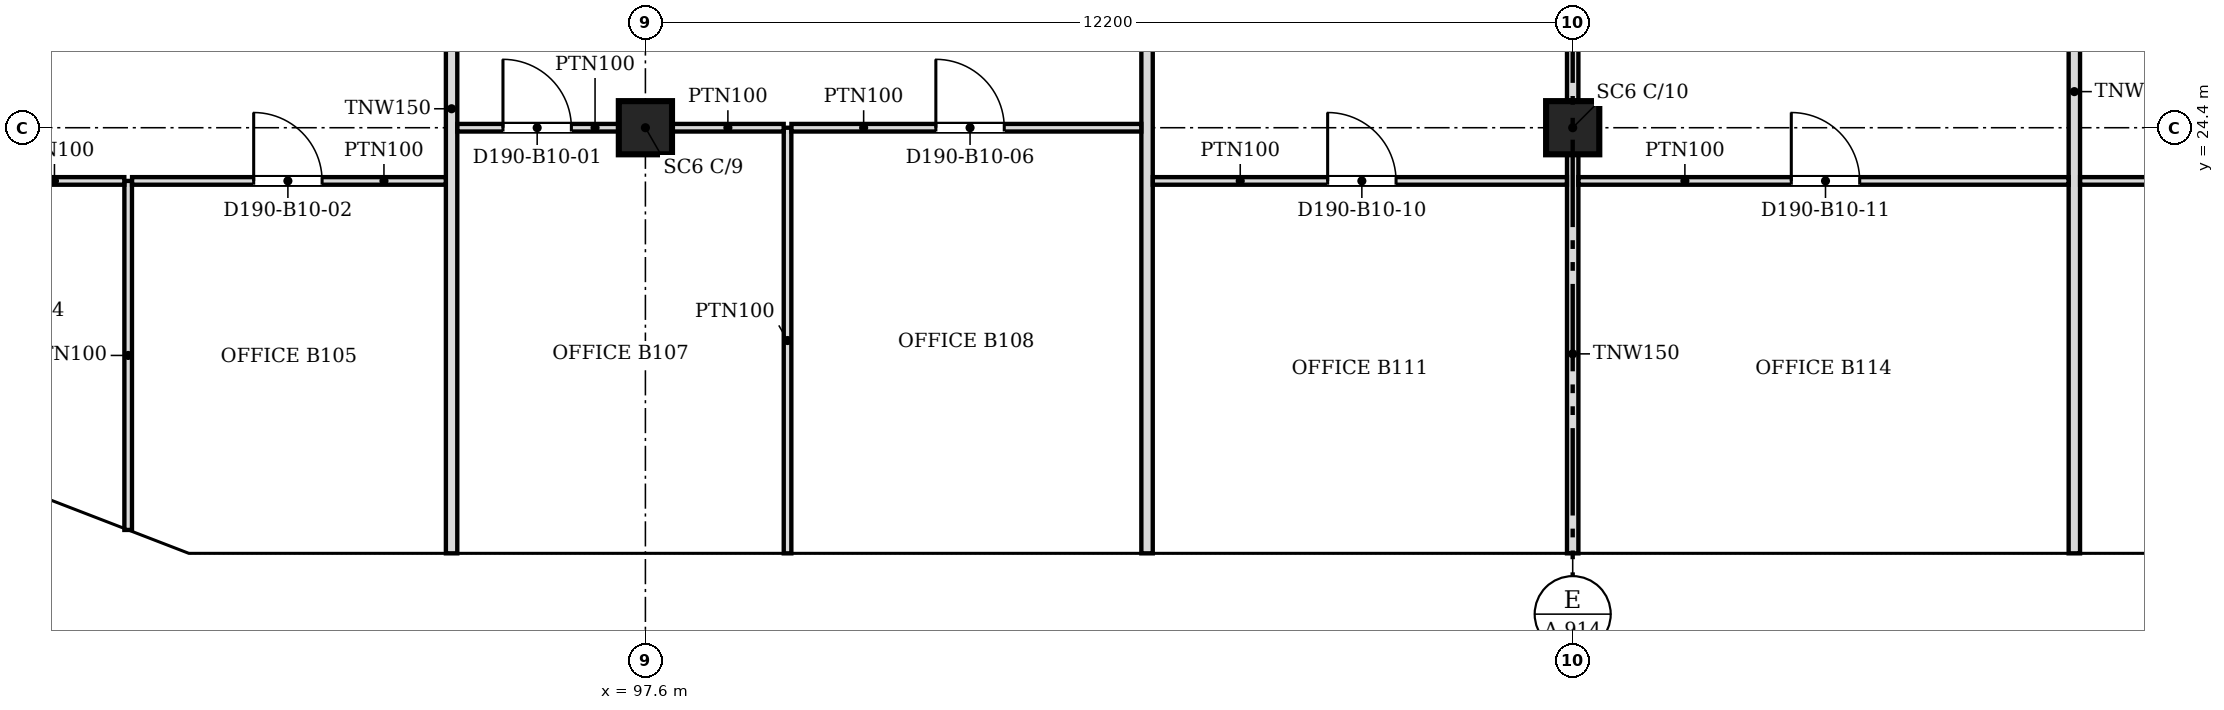
"""IFC4 building model, lengths in metres.
Left out: names, types, materials, properties, quantities, classifications, styles, units other than length and angle.
Written with IfcOpenShell. Run it as: python <this file> out.ifc"""

import sys

from ifc_helpers import new_model, si_unit, direction, frame, frame_2d, origin, origin_2d, place, context, subcontext, project, spatial, polyline, rectangle, outline, extrude, faceted_brep, source, transform, mapped, element, fill, save


model = new_model("IFC4")
c1 = context("Model", 3, precision=1e-05, world=origin(), true_north=direction((0.0, 1.0)))
c2 = subcontext(c1, "Body", "Model", "MODEL_VIEW")
j1 = project(units=[si_unit("LENGTHUNIT", "METRE"), si_unit("PLANEANGLEUNIT", "RADIAN")], contexts=[c1])
p1 = place(None, origin())
s1 = spatial("IfcSite", under=j1, at=p1, CompositionType="ELEMENT")
p2 = place(p1, origin())
s2 = spatial("IfcBuilding", under=s1, at=p2, CompositionType="ELEMENT")
p3 = place(p2, frame((0.0, 0.0, 99.0)))
s3 = spatial("IfcBuildingStorey", under=s2, at=p3, CompositionType="ELEMENT", Elevation=99.0)
for number, where, z_axis, x_axis in (
    (1, (97.6, 24.4, 0.0), (0.0, 0.0, 1.0), (1.0, 0.0, 0.0)),
    (2, (109.8, 24.4, 0.0), (0.0, 0.0, 1.0), (1.0, 0.0, 0.0)),
):
    element("IfcColumn", number, at=place(p3, frame(where, z_axis=z_axis, x_axis=x_axis)), inside=s3, PredefinedType="COLUMN", context=c2, shape_type="SweptSolid", body=[
        extrude(rectangle(XDim=0.7, YDim=0.7, at=origin_2d()), origin(), (0.0, 0.0, 1.0), 3.6),
    ])
m1 = source(origin(), c2, "Body", "Brep", [
    faceted_brep([(3.003, -0.25, 0.0), (6.053, -0.25, 3.8), (3.003, -0.25, 7.6), (0.0, -0.25, 3.8), (0.047, 0.25, 3.859), (3.003, 0.25, 7.6), (6.053, 0.25, 3.8), (3.003, 0.25, 0.0), (0.047, 0.25, 3.741), (0.0, 0.0, 3.8)], [[[0, 1, 2, 3]], [[4, 5, 6, 7, 8]], [[7, 6, 1, 0]], [[6, 5, 2, 1]], [[5, 4, 9, 3, 2]], [[8, 7, 0, 3, 9]], [[8, 9, 4]]]),
])
p4 = place(p3, frame((91.547, 18.55, -3.8), z_axis=(0.0, 0.0, 1.0), x_axis=(1.0, 0.0, 0.0)))
e3 = element("IfcWall", 3, at=p4, inside=s3, PredefinedType="SOLIDWALL", context=c2, shape_type="MappedRepresentation", body=[
    mapped(m1, transform((0.0, 0.0, 0.0), scale=1.0)),
])
m2 = source(origin(), c2, "Body", "SweptSolid", [
    extrude(outline(polyline([(3.005, 0.401), (5.733, 3.8), (3.005, 7.199), (0.319, 3.8), (3.005, 0.401)])), frame((0.0, 0.26, 0.0), z_axis=(0.0, -1.0, 0.0), x_axis=(1.0, 0.0, 0.0)), (0.0, 0.0, 1.0), 0.52),
])
p5 = place(p4, origin())
e4 = element("IfcOpeningElement", 4, at=p5, cuts=e3, PredefinedType="OPENING", context=c2, shape_type="MappedRepresentation", body=[
    mapped(m2, transform((0.0, 0.0, 0.0), scale=1.0)),
])
m3 = source(origin(), c2, "Body", "Brep", [
    faceted_brep([(3.05, -0.25, 0.0), (6.1, -0.25, 3.8), (6.1, -0.25, 3.8), (3.05, -0.25, 7.6), (0.0, -0.25, 3.8), (0.0, 0.25, 3.8), (3.05, 0.25, 7.6), (6.1, 0.25, 3.8), (6.1, 0.25, 3.8), (3.05, 0.25, 0.0)], [[[0, 1, 2, 3, 4]], [[5, 6, 7, 8, 9]], [[9, 8, 1, 0]], [[7, 6, 3, 2]], [[6, 5, 4, 3]], [[5, 9, 0, 4]], [[1, 8, 7, 2]]]),
])
p6 = place(p3, frame((97.6, 18.55, -3.8), z_axis=(0.0, 0.0, 1.0), x_axis=(1.0, 0.0, 0.0)))
e5 = element("IfcWall", 5, at=p6, inside=s3, PredefinedType="SOLIDWALL", context=c2, shape_type="MappedRepresentation", body=[
    mapped(m3, transform((0.0, 0.0, 0.0), scale=1.0)),
])
m4 = source(origin(), c2, "Body", "SweptSolid", [
    extrude(outline(polyline([(3.05, 0.399), (5.78, 3.8), (3.05, 7.201), (0.321, 3.8), (3.05, 0.399)])), frame((0.0, 0.26, 0.0), z_axis=(0.0, -1.0, 0.0), x_axis=(1.0, 0.0, 0.0)), (0.0, 0.0, 1.0), 0.52),
])
p7 = place(p6, origin())
e6 = element("IfcOpeningElement", 6, at=p7, cuts=e5, PredefinedType="OPENING", context=c2, shape_type="MappedRepresentation", body=[
    mapped(m4, transform((0.0, 0.0, 0.0), scale=1.0)),
])
m5 = source(origin(), c2, "Body", "SweptSolid", [
    extrude(outline(polyline([(3.05, 0.0), (6.1, 3.8), (3.05, 7.6), (0.0, 3.8), (3.05, 0.0)])), frame((0.0, 0.25, 0.0), z_axis=(0.0, -1.0, 0.0), x_axis=(1.0, 0.0, 0.0)), (0.0, 0.0, 1.0), 0.5),
])
p8 = place(p3, frame((103.7, 18.55, -3.8), z_axis=(0.0, 0.0, 1.0), x_axis=(1.0, 0.0, 0.0)))
e7 = element("IfcWall", 7, at=p8, inside=s3, PredefinedType="SOLIDWALL", context=c2, shape_type="MappedRepresentation", body=[
    mapped(m5, transform((0.0, 0.0, 0.0), scale=1.0)),
])
p9 = place(p8, origin())
e8 = element("IfcOpeningElement", 8, at=p9, cuts=e7, PredefinedType="OPENING", context=c2, shape_type="MappedRepresentation", body=[
    mapped(m4, transform((0.0, 0.0, 0.0), scale=1.0)),
])
p10 = place(p3, frame((109.8, 18.55, -3.8), z_axis=(0.0, 0.0, 1.0), x_axis=(1.0, 0.0, 0.0)))
e9 = element("IfcWall", 9, at=p10, inside=s3, PredefinedType="SOLIDWALL", context=c2, shape_type="MappedRepresentation", body=[
    mapped(m3, transform((0.0, 0.0, 0.0), scale=1.0)),
])
p11 = place(p10, origin())
e10 = element("IfcOpeningElement", 10, at=p11, cuts=e9, PredefinedType="OPENING", context=c2, shape_type="MappedRepresentation", body=[
    mapped(m4, transform((0.0, 0.0, 0.0), scale=1.0)),
])
p12 = place(p3, frame((115.9, 18.55, -3.8), z_axis=(0.0, 0.0, 1.0), x_axis=(1.0, 0.0, 0.0)))
e11 = element("IfcWall", 11, at=p12, inside=s3, PredefinedType="SOLIDWALL", context=c2, shape_type="MappedRepresentation", body=[
    mapped(m5, transform((0.0, 0.0, 0.0), scale=1.0)),
])
p13 = place(p12, origin())
e12 = element("IfcOpeningElement", 12, at=p13, cuts=e11, PredefinedType="OPENING", context=c2, shape_type="MappedRepresentation", body=[
    mapped(m4, transform((0.0, 0.0, 0.0), scale=1.0)),
])
m6 = source(origin(), c2, "Body", "Brep", [
    faceted_brep([(0.053, -0.25, 0.0), (3.003, -0.25, 3.8), (0.053, -0.25, 7.6), (0.0, -0.25, 7.532), (0.0, -0.25, 0.068), (0.106, 0.25, 7.532), (2.957, 0.25, 3.86), (2.957, 0.25, 3.74), (0.106, 0.25, 0.068), (3.003, 0.0, 3.8), (0.053, 0.0, 0.0), (0.053, 0.0, 7.6)], [[[0, 1, 2, 3, 4]], [[5, 6, 7, 8]], [[8, 7, 9, 1, 0, 10]], [[6, 5, 11, 2, 1, 9]], [[3, 2, 11]], [[10, 0, 4]], [[8, 10, 4, 3, 11, 5]], [[9, 7, 6]]]),
])
p14 = place(p3, frame((88.744, 19.631, -3.8), z_axis=(0.0, 0.0, 1.0), x_axis=(0.932997369089, -0.359883188373, 0.0)))
e13 = element("IfcWall", 13, at=p14, inside=s3, PredefinedType="SOLIDWALL", context=c2, shape_type="MappedRepresentation", body=[
    mapped(m6, transform((0.0, 0.0, 0.0), scale=1.0)),
])
m7 = source(origin(), c2, "Body", "SweptSolid", [
    extrude(outline(polyline([(0.253, 0.665), (2.687, 3.8), (0.253, 6.935), (0.253, 0.665)])), frame((0.0, 0.26, 0.0), z_axis=(0.0, -1.0, 0.0), x_axis=(1.0, 0.0, 0.0)), (0.0, 0.0, 1.0), 0.52),
])
p15 = place(p14, origin())
e14 = element("IfcOpeningElement", 14, at=p15, cuts=e13, PredefinedType="OPENING", context=c2, shape_type="MappedRepresentation", body=[
    mapped(m7, transform((0.0, 0.0, 0.0), scale=1.0)),
])
p16 = place(p2, frame((0.0, 0.0, 102.8)))
s4 = spatial("IfcBuildingStorey", under=s2, at=p16, CompositionType="ELEMENT", Elevation=102.8)
m8 = source(origin(), c2, "Body", "Brep", [
    faceted_brep([(0.047, -0.25, 0.0), (3.05, -0.25, 3.8), (0.047, -0.25, 7.6), (0.0, -0.25, 7.54), (0.0, -0.25, 0.06), (0.093, 0.25, 7.541), (3.05, 0.25, 3.8), (0.093, 0.25, 0.059), (0.047, 0.0, 0.0), (0.047, 0.0, 7.6)], [[[0, 1, 2, 3, 4]], [[5, 6, 7]], [[7, 6, 1, 0, 8]], [[6, 5, 9, 2, 1]], [[3, 2, 9]], [[8, 0, 4]], [[7, 8, 4, 3, 9, 5]]]),
])
p17 = place(p16, frame((91.5, 18.55, -3.8), z_axis=(0.0, 0.0, 1.0), x_axis=(1.0, 0.0, 0.0)))
e15 = element("IfcWall", 15, at=p17, inside=s4, PredefinedType="SOLIDWALL", context=c2, shape_type="MappedRepresentation", body=[
    mapped(m8, transform((0.0, 0.0, 0.0), scale=1.0)),
])
m9 = source(origin(), c2, "Body", "SweptSolid", [
    extrude(outline(polyline([(0.247, 0.656), (2.731, 3.8), (0.247, 6.944), (0.247, 0.656)])), frame((0.0, 0.26, 0.0), z_axis=(0.0, -1.0, 0.0), x_axis=(1.0, 0.0, 0.0)), (0.0, 0.0, 1.0), 0.52),
])
p18 = place(p17, origin())
e16 = element("IfcOpeningElement", 16, at=p18, cuts=e15, PredefinedType="OPENING", context=c2, shape_type="MappedRepresentation", body=[
    mapped(m9, transform((0.0, 0.0, 0.0), scale=1.0)),
])
m10 = source(origin(), c2, "Body", "Brep", [
    faceted_brep([(2.95, -0.25, 0.0), (2.997, -0.25, 0.059), (2.997, -0.25, 7.541), (2.95, -0.25, 7.6), (0.0, -0.25, 3.8), (0.053, 0.25, 3.868), (2.904, 0.25, 7.54), (2.904, 0.25, 0.06), (0.053, 0.25, 3.732), (2.95, 0.0, 0.0), (2.95, 0.0, 7.6), (0.0, 0.0, 3.8)], [[[0, 1, 2, 3, 4]], [[5, 6, 7, 8]], [[1, 0, 9]], [[10, 3, 2]], [[6, 5, 11, 4, 3, 10]], [[8, 7, 9, 0, 4, 11]], [[8, 11, 5]], [[1, 9, 7, 6, 10, 2]]]),
])
p19 = place(p16, frame((88.794, 19.612, -3.8), z_axis=(0.0, 0.0, 1.0), x_axis=(0.933000876937, -0.359874094142, 0.0)))
e17 = element("IfcWall", 17, at=p19, inside=s4, PredefinedType="SOLIDWALL", context=c2, shape_type="MappedRepresentation", body=[
    mapped(m10, transform((0.0, 0.0, 0.0), scale=1.0)),
])
m11 = source(origin(), c2, "Body", "SweptSolid", [
    extrude(outline(polyline([(2.75, 6.935), (0.316, 3.8), (2.75, 0.665), (2.75, 6.935)])), frame((0.0, 0.26, 0.0), z_axis=(0.0, -1.0, 0.0), x_axis=(1.0, 0.0, 0.0)), (0.0, 0.0, 1.0), 0.52),
])
p20 = place(p19, origin())
e18 = element("IfcOpeningElement", 18, at=p20, cuts=e17, PredefinedType="OPENING", context=c2, shape_type="MappedRepresentation", body=[
    mapped(m11, transform((0.0, 0.0, 0.0), scale=1.0)),
])
p21 = place(p16, frame((94.55, 18.55, -3.8), z_axis=(0.0, 0.0, 1.0), x_axis=(1.0, 0.0, 0.0)))
e19 = element("IfcWall", 19, at=p21, inside=s4, PredefinedType="SOLIDWALL", context=c2, shape_type="MappedRepresentation", body=[
    mapped(m3, transform((0.0, 0.0, 0.0), scale=1.0)),
])
p22 = place(p21, origin())
e20 = element("IfcOpeningElement", 20, at=p22, cuts=e19, PredefinedType="OPENING", context=c2, shape_type="MappedRepresentation", body=[
    mapped(m4, transform((0.0, 0.0, 0.0), scale=1.0)),
])
p23 = place(p16, frame((100.65, 18.55, -3.8), z_axis=(0.0, 0.0, 1.0), x_axis=(1.0, 0.0, 0.0)))
e21 = element("IfcWall", 21, at=p23, inside=s4, PredefinedType="SOLIDWALL", context=c2, shape_type="MappedRepresentation", body=[
    mapped(m5, transform((0.0, 0.0, 0.0), scale=1.0)),
])
p24 = place(p23, origin())
e22 = element("IfcOpeningElement", 22, at=p24, cuts=e21, PredefinedType="OPENING", context=c2, shape_type="MappedRepresentation", body=[
    mapped(m4, transform((0.0, 0.0, 0.0), scale=1.0)),
])
p25 = place(p16, frame((106.75, 18.55, -3.8), z_axis=(0.0, 0.0, 1.0), x_axis=(1.0, 0.0, 0.0)))
e23 = element("IfcWall", 23, at=p25, inside=s4, PredefinedType="SOLIDWALL", context=c2, shape_type="MappedRepresentation", body=[
    mapped(m5, transform((0.0, 0.0, 0.0), scale=1.0)),
])
p26 = place(p25, origin())
e24 = element("IfcOpeningElement", 24, at=p26, cuts=e23, PredefinedType="OPENING", context=c2, shape_type="MappedRepresentation", body=[
    mapped(m4, transform((0.0, 0.0, 0.0), scale=1.0)),
])
p27 = place(p16, frame((112.85, 18.55, -3.8), z_axis=(0.0, 0.0, 1.0), x_axis=(1.0, 0.0, 0.0)))
e25 = element("IfcWall", 25, at=p27, inside=s4, PredefinedType="SOLIDWALL", context=c2, shape_type="MappedRepresentation", body=[
    mapped(m3, transform((0.0, 0.0, 0.0), scale=1.0)),
])
p28 = place(p27, origin())
e26 = element("IfcOpeningElement", 26, at=p28, cuts=e25, PredefinedType="OPENING", context=c2, shape_type="MappedRepresentation", body=[
    mapped(m4, transform((0.0, 0.0, 0.0), scale=1.0)),
])
p29 = place(p3, frame((95.05, 18.8, 0.0), z_axis=(0.0, 0.0, 1.0), x_axis=(0.0, 1.0, 0.0)))
e27 = element("IfcWall", 27, at=p29, inside=s3, PredefinedType="PARTITIONING", context=c2, shape_type="SweptSolid", body=[
    extrude(rectangle(XDim=11.699, YDim=0.15, at=frame_2d((5.85, 0.0))), origin(), (0.0, 0.0, 1.0), 3.067),
])
p30 = place(p3, frame((99.47, 18.8, 0.0), z_axis=(0.0, 0.0, 1.0), x_axis=(0.0, 1.0, 0.0)))
e28 = element("IfcWall", 28, at=p30, inside=s3, PredefinedType="PARTITIONING", context=c2, shape_type="SweptSolid", body=[
    extrude(rectangle(XDim=5.6, YDim=0.1, at=frame_2d((2.8, 0.0))), origin(), (0.0, 0.0, 1.0), 3.067),
])
p31 = place(p3, frame((104.2, 18.8, 0.0), z_axis=(0.0, 0.0, 1.0), x_axis=(0.0, 1.0, 0.0)))
e29 = element("IfcWall", 29, at=p31, inside=s3, PredefinedType="PARTITIONING", context=c2, shape_type="SweptSolid", body=[
    extrude(rectangle(XDim=15.124, YDim=0.15, at=frame_2d((7.562, 0.0))), origin(), (0.0, 0.0, 1.0), 3.067),
])
p32 = place(p3, frame((109.8, 18.8, 0.0), z_axis=(0.0, 0.0, 1.0), x_axis=(0.0, 1.0, 0.0)))
e30 = element("IfcWall", 30, at=p32, inside=s3, PredefinedType="PARTITIONING", context=c2, shape_type="SweptSolid", body=[
    extrude(rectangle(XDim=5.249, YDim=0.15, at=frame_2d((2.625, 0.0))), origin(), (0.0, 0.0, 1.0), 3.067),
])
p33 = place(p3, frame((116.4, 18.8, 0.0), z_axis=(0.0, 0.0, 1.0), x_axis=(0.0, 1.0, 0.0)))
e31 = element("IfcWall", 31, at=p33, inside=s3, PredefinedType="PARTITIONING", context=c2, shape_type="SweptSolid", body=[
    extrude(rectangle(XDim=12.15, YDim=0.15, at=frame_2d((6.075, 0.0))), origin(), (0.0, 0.0, 1.0), 3.067),
])
p34 = place(p3, frame((90.795, 19.108, 0.0), z_axis=(0.0, 0.0, 1.0), x_axis=(0.0, 1.0, 0.0)))
e32 = element("IfcWall", 32, at=p34, inside=s3, PredefinedType="PARTITIONING", context=c2, shape_type="SweptSolid", body=[
    extrude(rectangle(XDim=4.592, YDim=0.1, at=frame_2d((2.296, 0.0))), origin(), (0.0, 0.0, 1.0), 3.067),
])
p35 = place(p3, frame((90.744, 23.7, 0.0), z_axis=(0.0, 0.0, 1.0), x_axis=(-1.0, 0.0, 0.0)))
e33 = element("IfcWall", 33, at=p35, inside=s3, PredefinedType="PARTITIONING", context=c2, shape_type="SweptSolid", body=[
    extrude(rectangle(XDim=4.538, YDim=0.1, at=frame_2d((2.269, 0.0))), origin(), (0.0, 0.0, 1.0), 3.067),
])
m12 = source(origin(), c2, "Body", "SweptSolid", [
    extrude(rectangle(XDim=0.9, YDim=2.1, at=frame_2d((0.45, 1.05))), frame((0.0, 0.06, 0.0), z_axis=(0.0, -1.0, 0.0), x_axis=(1.0, 0.0, 0.0)), (0.0, 0.0, 1.0), 0.12),
])
p36 = place(p35, frame((1.838, 0.0, 0.0)))
e34 = element("IfcOpeningElement", 34, at=p36, cuts=e33, PredefinedType="OPENING", context=c2, shape_type="MappedRepresentation", body=[
    mapped(m12, transform((0.0, 0.0, 0.0), scale=1.0)),
])
p37 = place(p3, frame((94.974, 23.7, 0.0), z_axis=(0.0, 0.0, 1.0), x_axis=(-1.0, 0.0, 0.0)))
e35 = element("IfcWall", 35, at=p37, inside=s3, PredefinedType="PARTITIONING", context=c2, shape_type="SweptSolid", body=[
    extrude(rectangle(XDim=4.128, YDim=0.1, at=frame_2d((2.064, 0.0))), origin(), (0.0, 0.0, 1.0), 3.067),
])
p38 = place(p37, frame((1.628, 0.0, 0.0)))
e36 = element("IfcOpeningElement", 36, at=p38, cuts=e35, PredefinedType="OPENING", context=c2, shape_type="MappedRepresentation", body=[
    mapped(m12, transform((0.0, 0.0, 0.0), scale=1.0)),
])
p39 = place(p3, frame((109.724, 23.7, 0.0), z_axis=(0.0, 0.0, 1.0), x_axis=(-1.0, 0.0, 0.0)))
e37 = element("IfcWall", 37, at=p39, inside=s3, PredefinedType="PARTITIONING", context=c2, shape_type="SweptSolid", body=[
    extrude(rectangle(XDim=5.448, YDim=0.1, at=frame_2d((2.724, 0.0))), origin(), (0.0, 0.0, 1.0), 3.067),
])
p40 = place(p39, frame((2.248, 0.0, 0.0)))
e38 = element("IfcOpeningElement", 38, at=p40, cuts=e37, PredefinedType="OPENING", context=c2, shape_type="MappedRepresentation", body=[
    mapped(m12, transform((0.0, 0.0, 0.0), scale=1.0)),
])
p41 = place(p3, frame((116.324, 23.7, 0.0), z_axis=(0.0, 0.0, 1.0), x_axis=(-1.0, 0.0, 0.0)))
e39 = element("IfcWall", 39, at=p41, inside=s3, PredefinedType="PARTITIONING", context=c2, shape_type="SweptSolid", body=[
    extrude(rectangle(XDim=6.448, YDim=0.1, at=frame_2d((3.224, 0.0))), origin(), (0.0, 0.0, 1.0), 3.067),
])
p42 = place(p41, frame((2.748, 0.0, 0.0)))
e40 = element("IfcOpeningElement", 40, at=p42, cuts=e39, PredefinedType="OPENING", context=c2, shape_type="MappedRepresentation", body=[
    mapped(m12, transform((0.0, 0.0, 0.0), scale=1.0)),
])
p43 = place(p3, frame((121.424, 23.7, 0.0), z_axis=(0.0, 0.0, 1.0), x_axis=(-1.0, 0.0, 0.0)))
e41 = element("IfcWall", 41, at=p43, inside=s3, PredefinedType="PARTITIONING", context=c2, shape_type="SweptSolid", body=[
    extrude(rectangle(XDim=4.948, YDim=0.1, at=frame_2d((2.474, 0.0))), origin(), (0.0, 0.0, 1.0), 3.067),
])
p44 = place(p43, frame((2.048, 0.0, 0.0)))
e42 = element("IfcOpeningElement", 42, at=p44, cuts=e41, PredefinedType="OPENING", context=c2, shape_type="MappedRepresentation", body=[
    mapped(m12, transform((0.0, 0.0, 0.0), scale=1.0)),
])
p45 = place(p3, frame((97.249, 24.4, 0.0), z_axis=(0.0, 0.0, 1.0), x_axis=(-1.0, 0.0, 0.0)))
e43 = element("IfcWall", 43, at=p45, inside=s3, PredefinedType="PARTITIONING", context=c2, shape_type="SweptSolid", body=[
    extrude(rectangle(XDim=2.123, YDim=0.1, at=frame_2d((1.062, 0.0))), origin(), (0.0, 0.0, 1.0), 3.067),
])
p46 = place(p45, frame((0.623, 0.0, 0.0)))
e44 = element("IfcOpeningElement", 44, at=p46, cuts=e43, PredefinedType="OPENING", context=c2, shape_type="MappedRepresentation", body=[
    mapped(m12, transform((0.0, 0.0, 0.0), scale=1.0)),
])
p47 = place(p3, frame((97.951, 24.4, 0.0), z_axis=(0.0, 0.0, 1.0), x_axis=(1.0, 0.0, 0.0)))
e45 = element("IfcWall", 45, at=p47, inside=s3, PredefinedType="PARTITIONING", context=c2, shape_type="SweptSolid", body=[
    extrude(rectangle(XDim=1.468, YDim=0.1, at=frame_2d((0.734, 0.0))), origin(), (0.0, 0.0, 1.0), 3.067),
])
p48 = place(p3, frame((104.124, 24.4, 0.0), z_axis=(0.0, 0.0, 1.0), x_axis=(-1.0, 0.0, 0.0)))
e46 = element("IfcWall", 46, at=p48, inside=s3, PredefinedType="PARTITIONING", context=c2, shape_type="SweptSolid", body=[
    extrude(rectangle(XDim=4.603, YDim=0.1, at=frame_2d((2.301, 0.0))), origin(), (0.0, 0.0, 1.0), 3.067),
])
p49 = place(p48, frame((1.803, 0.0, 0.0)))
e47 = element("IfcOpeningElement", 47, at=p49, cuts=e46, PredefinedType="OPENING", context=c2, shape_type="MappedRepresentation", body=[
    mapped(m12, transform((0.0, 0.0, 0.0), scale=1.0)),
])
p50 = place(p3, frame((109.8, 24.751, 0.0), z_axis=(0.0, 0.0, 1.0), x_axis=(0.0, 1.0, 0.0)))
e48 = element("IfcWall", 48, at=p50, inside=s3, PredefinedType="PARTITIONING", context=c2, shape_type="SweptSolid", body=[
    extrude(rectangle(XDim=6.123, YDim=0.15, at=frame_2d((3.062, 0.0))), origin(), (0.0, 0.0, 1.0), 3.067),
])
m13 = source(origin(), c2, "Body", "SweptSolid", [
    extrude(rectangle(XDim=0.9, YDim=2.1, at=frame_2d((0.45, 1.05))), frame((0.0, 0.025, 0.0), z_axis=(0.0, -1.0, 0.0), x_axis=(1.0, 0.0, 0.0)), (0.0, 0.0, 1.0), 0.05),
])
p51 = place(p46, origin())
e49 = element("IfcDoor", 49, at=p51, inside=s3, OperationType="SINGLE_SWING_RIGHT", PredefinedType="DOOR", context=c2, shape_type="MappedRepresentation", body=[
    mapped(m13, transform((0.0, 0.0, 0.0), scale=1.0)),
])
fill(e44, e49)
p52 = place(p38, origin())
e50 = element("IfcDoor", 50, at=p52, inside=s3, OperationType="SINGLE_SWING_RIGHT", PredefinedType="DOOR", context=c2, shape_type="MappedRepresentation", body=[
    mapped(m13, transform((0.0, 0.0, 0.0), scale=1.0)),
])
fill(e36, e50)
p53 = place(p49, origin())
e51 = element("IfcDoor", 51, at=p53, inside=s3, OperationType="SINGLE_SWING_RIGHT", PredefinedType="DOOR", context=c2, shape_type="MappedRepresentation", body=[
    mapped(m13, transform((0.0, 0.0, 0.0), scale=1.0)),
])
fill(e47, e51)
p54 = place(p40, origin())
e52 = element("IfcDoor", 52, at=p54, inside=s3, OperationType="SINGLE_SWING_RIGHT", PredefinedType="DOOR", context=c2, shape_type="MappedRepresentation", body=[
    mapped(m13, transform((0.0, 0.0, 0.0), scale=1.0)),
])
fill(e38, e52)
p55 = place(p42, origin())
e53 = element("IfcDoor", 53, at=p55, inside=s3, OperationType="SINGLE_SWING_RIGHT", PredefinedType="DOOR", context=c2, shape_type="MappedRepresentation", body=[
    mapped(m13, transform((0.0, 0.0, 0.0), scale=1.0)),
])
fill(e40, e53)
save(model, sys.argv[1])
